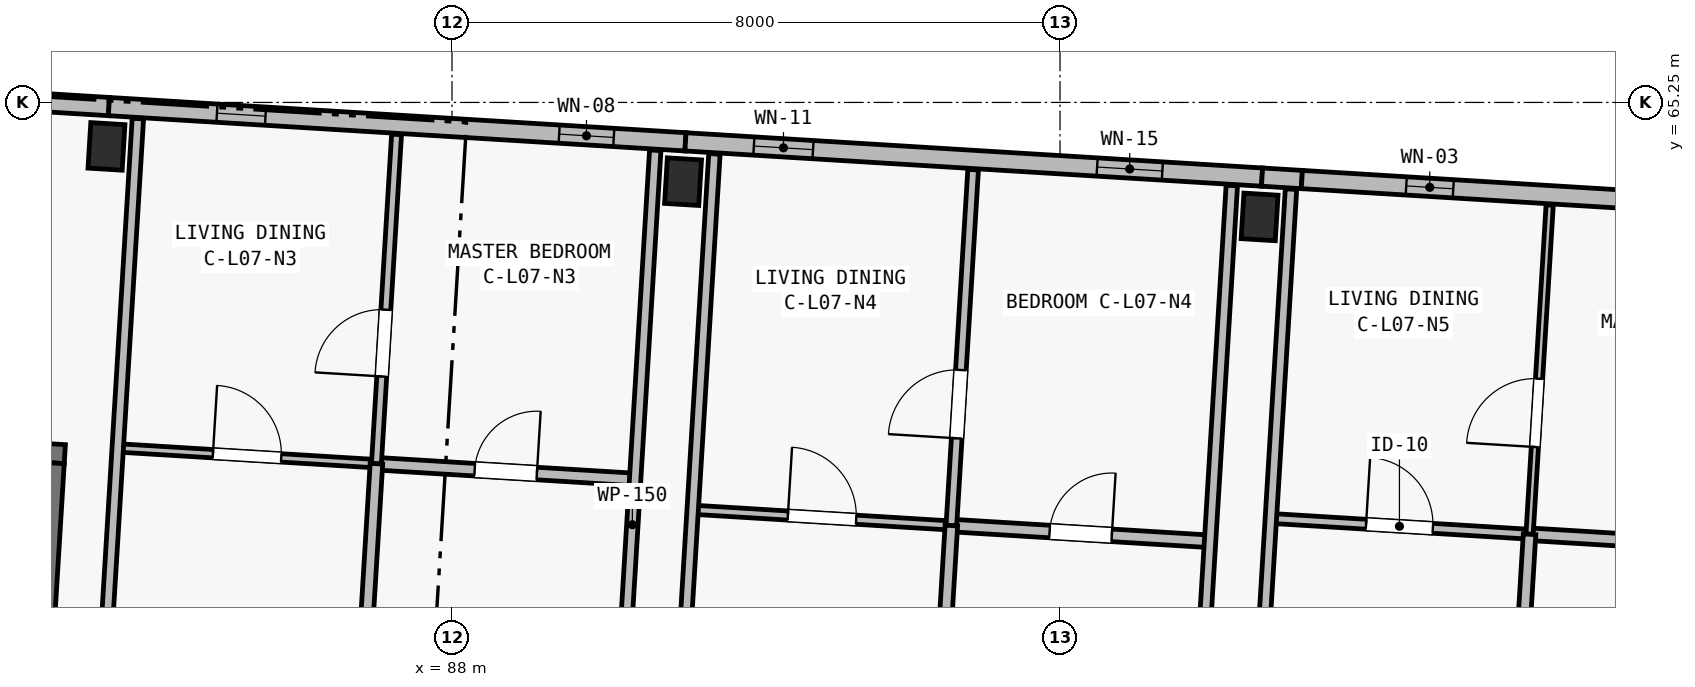
"""IFC4 building model, lengths in metres.
Left out: names, types, materials, properties, quantities, classifications, styles, units other than length and angle.
Written with IfcOpenShell. Run it as: python <this file> out.ifc"""

import sys

from ifc_helpers import new_model, si_unit, direction, frame, frame_2d, origin, origin_2d, place, context, subcontext, project, spatial, polyline, rectangle, outline, extrude, element, fill, save


model = new_model("IFC4")
c1 = context("Model", 3, precision=1e-05, world=origin(), true_north=direction((0.0, 1.0)))
c2 = subcontext(c1, "Body", "Model", "MODEL_VIEW")
j1 = project(units=[si_unit("LENGTHUNIT", "METRE"), si_unit("PLANEANGLEUNIT", "RADIAN")], contexts=[c1])
p1 = place(None, origin())
s1 = spatial("IfcSite", under=j1, at=p1, CompositionType="ELEMENT")
p2 = place(p1, origin())
s2 = spatial("IfcBuilding", under=s1, at=p2, CompositionType="ELEMENT")
p3 = place(p2, frame((0.0, 0.0, 24.65)))
s3 = spatial("IfcBuildingStorey", under=s2, at=p3, CompositionType="ELEMENT", Elevation=24.65)
for number, where, z_axis, x_axis in (
    (1, (83.454, 64.672, 0.0), (0.0, 0.0, 1.0), (0.998, -0.061, 0.0)),
    (2, (91.04, 64.208, 0.0), (0.0, 0.0, 1.0), (0.998, -0.061, 0.0)),
    (3, (98.626, 63.744, 0.0), (0.0, 0.0, 1.0), (0.998, -0.061, 0.0)),
):
    element("IfcColumn", number, at=place(p3, frame(where, z_axis=z_axis, x_axis=x_axis)), inside=s3, PredefinedType="COLUMN", context=c2, shape_type="SweptSolid", body=[
        extrude(rectangle(XDim=0.45, YDim=0.6, at=origin_2d()), origin(), (0.0, 0.0, 1.0), 3.25),
    ])
p4 = place(p3, frame((75.919, 61.05, 0.0), z_axis=(0.0, 0.0, 1.0), x_axis=(0.998135546153, -0.061036313012, 0.0)))
e4 = element("IfcWall", 4, at=p4, inside=s3, PredefinedType="SHEAR", context=c2, shape_type="SweptSolid", body=[
    extrude(rectangle(XDim=7.0, YDim=0.25, at=frame_2d((3.5, 0.0))), origin(), (0.0, 0.0, 1.0), 3.25),
])
p5 = place(p4, frame((0.45, 0.0, 0.0)))
e5 = element("IfcOpeningElement", 5, at=p5, cuts=e4, PredefinedType="OPENING", context=c2, shape_type="SweptSolid", body=[
    extrude(rectangle(XDim=0.9, YDim=2.1, at=frame_2d((0.45, 1.05))), frame((0.0, 0.14, 0.0), z_axis=(0.0, -1.0, 0.0), x_axis=(1.0, 0.0, 0.0)), (0.0, 0.0, 1.0), 0.28),
])
p6 = place(p3, frame((82.599, 57.661, 0.0), z_axis=(0.0, 0.0, 1.0), x_axis=(0.06107697143, 0.998133059046, 0.0)))
e6 = element("IfcWall", 6, at=p6, inside=s3, PredefinedType="SHEAR", context=c2, shape_type="SweptSolid", body=[
    extrude(rectangle(XDim=2.85, YDim=0.25, at=frame_2d((1.425, 0.0))), origin(), (0.0, 0.0, 1.0), 3.25),
])
p7 = place(p3, frame((81.115, 65.341, 0.0), z_axis=(0.0, 0.0, 1.0), x_axis=(0.998134103342, -0.061059902923, 0.0)))
e7 = element("IfcWall", 7, at=p7, inside=s3, PredefinedType="SOLIDWALL", context=c2, shape_type="SweptSolid", body=[
    extrude(rectangle(XDim=2.375, YDim=0.24, at=frame_2d((1.188, 0.0))), origin(), (0.0, 0.0, 1.0), 3.0),
])
p8 = place(p3, frame((83.486, 65.196, 0.0), z_axis=(0.0, 0.0, 1.0), x_axis=(0.998135669243, -0.061034300063, 0.0)))
e8 = element("IfcWall", 8, at=p8, inside=s3, PredefinedType="SOLIDWALL", context=c2, shape_type="SweptSolid", body=[
    extrude(rectangle(XDim=7.6, YDim=0.24, at=frame_2d((3.8, 0.0))), origin(), (0.0, 0.0, 1.0), 3.0),
])
p9 = place(p8, frame((1.424, 0.0, 0.44)))
e9 = element("IfcOpeningElement", 9, at=p9, cuts=e8, PredefinedType="OPENING", context=c2, shape_type="SweptSolid", body=[
    extrude(rectangle(XDim=0.64, YDim=2.18, at=frame_2d((0.32, 1.09))), frame((0.0, 0.135, 0.0), z_axis=(0.0, -1.0, 0.0), x_axis=(1.0, 0.0, 0.0)), (0.0, 0.0, 1.0), 0.27),
])
p10 = place(p8, frame((5.935, 0.0, 0.5)))
e10 = element("IfcOpeningElement", 10, at=p10, cuts=e8, PredefinedType="OPENING", context=c2, shape_type="SweptSolid", body=[
    extrude(rectangle(XDim=0.72, YDim=2.16, at=frame_2d((0.36, 1.08))), frame((0.0, 0.135, 0.0), z_axis=(0.0, -1.0, 0.0), x_axis=(1.0, 0.0, 0.0)), (0.0, 0.0, 1.0), 0.27),
])
p11 = place(p3, frame((91.072, 64.732, 0.0), z_axis=(0.0, 0.0, 1.0), x_axis=(0.998133591969, -0.061068261669, 0.0)))
e11 = element("IfcWall", 11, at=p11, inside=s3, PredefinedType="SOLIDWALL", context=c2, shape_type="SweptSolid", body=[
    extrude(rectangle(XDim=7.6, YDim=0.24, at=frame_2d((3.8, 0.0))), origin(), (0.0, 0.0, 1.0), 3.0),
])
p12 = place(p11, frame((0.902, 0.0, 0.5)))
e12 = element("IfcOpeningElement", 12, at=p12, cuts=e11, PredefinedType="OPENING", context=c2, shape_type="SweptSolid", body=[
    extrude(rectangle(XDim=0.78, YDim=2.2, at=frame_2d((0.39, 1.1))), frame((0.0, 0.135, 0.0), z_axis=(0.0, -1.0, 0.0), x_axis=(1.0, 0.0, 0.0)), (0.0, 0.0, 1.0), 0.27),
])
p13 = place(p11, frame((5.426, 0.0, 0.44)))
e13 = element("IfcOpeningElement", 13, at=p13, cuts=e11, PredefinedType="OPENING", context=c2, shape_type="SweptSolid", body=[
    extrude(rectangle(XDim=0.86, YDim=2.36, at=frame_2d((0.43, 1.18))), frame((0.0, 0.135, 0.0), z_axis=(0.0, -1.0, 0.0), x_axis=(1.0, 0.0, 0.0)), (0.0, 0.0, 1.0), 0.27),
])
p14 = place(p3, frame((98.658, 64.268, 0.0), z_axis=(0.0, 0.0, 1.0), x_axis=(0.998142018096, -0.060930384143, 0.0)))
e14 = element("IfcWall", 14, at=p14, inside=s3, PredefinedType="SOLIDWALL", context=c2, shape_type="SweptSolid", body=[
    extrude(rectangle(XDim=0.525, YDim=0.24, at=frame_2d((0.262, 0.0))), origin(), (0.0, 0.0, 1.0), 3.0),
])
p15 = place(p3, frame((99.182, 64.236, 0.0), z_axis=(0.0, 0.0, 1.0), x_axis=(0.998133711765, -0.06106630362, 0.0)))
e15 = element("IfcWall", 15, at=p15, inside=s3, PredefinedType="SOLIDWALL", context=c2, shape_type="SweptSolid", body=[
    extrude(outline(polyline([(0.0, 0.0), (7.6, 0.0), (7.6, 5.085), (0.0, 6.548), (0.0, 0.0)])), frame((0.0, 0.12, 0.0), z_axis=(0.0, -1.0, 0.0), x_axis=(1.0, 0.0, 0.0)), (0.0, 0.0, 1.0), 0.24),
])
p16 = place(p15, frame((1.376, 0.0, 0.44)))
e16 = element("IfcOpeningElement", 16, at=p16, cuts=e15, PredefinedType="OPENING", context=c2, shape_type="SweptSolid", body=[
    extrude(rectangle(XDim=0.62, YDim=2.28, at=frame_2d((0.31, 1.14))), frame((0.0, 0.135, 0.0), z_axis=(0.0, -1.0, 0.0), x_axis=(1.0, 0.0, 0.0)), (0.0, 0.0, 1.0), 0.27),
])
p17 = place(p15, frame((4.505, 0.0, 0.5)))
e17 = element("IfcOpeningElement", 17, at=p17, cuts=e15, PredefinedType="OPENING", context=c2, shape_type="SweptSolid", body=[
    extrude(rectangle(XDim=0.7, YDim=2.36, at=frame_2d((0.35, 1.18))), frame((0.0, 0.135, 0.0), z_axis=(0.0, -1.0, 0.0), x_axis=(1.0, 0.0, 0.0)), (0.0, 0.0, 1.0), 0.27),
])
p18 = place(p3, frame((83.602, 60.705, 0.0), z_axis=(0.0, 0.0, 1.0), x_axis=(0.998133617109, -0.061067850767, 0.0)))
e18 = element("IfcWall", 18, at=p18, inside=s3, PredefinedType="PARTITIONING", context=c2, shape_type="SweptSolid", body=[
    extrude(rectangle(XDim=3.41, YDim=0.11, at=frame_2d((1.705, 0.0))), origin(), (0.0, 0.0, 1.0), 2.97),
])
p19 = place(p18, frame((1.255, 0.0, 0.0)))
e19 = element("IfcOpeningElement", 19, at=p19, cuts=e18, PredefinedType="OPENING", context=c2, shape_type="SweptSolid", body=[
    extrude(rectangle(XDim=0.9, YDim=2.1, at=frame_2d((0.45, 1.05))), frame((0.0, 0.07, 0.0), z_axis=(0.0, -1.0, 0.0), x_axis=(1.0, 0.0, 0.0)), (0.0, 0.0, 1.0), 0.14),
])
p20 = place(p3, frame((87.006, 60.497, 0.0), z_axis=(0.0, 0.0, 1.0), x_axis=(0.998137711988, -0.061000884486, 0.0)))
e20 = element("IfcWall", 20, at=p20, inside=s3, PredefinedType="PLUMBINGWALL", context=c2, shape_type="SweptSolid", body=[
    extrude(rectangle(XDim=3.41, YDim=0.165, at=frame_2d((1.705, 0.0))), origin(), (0.0, 0.0, 1.0), 2.97),
])
p21 = place(p20, frame((1.295, 0.0, 0.0)))
e21 = element("IfcOpeningElement", 21, at=p21, cuts=e20, PredefinedType="OPENING", context=c2, shape_type="SweptSolid", body=[
    extrude(rectangle(XDim=0.82, YDim=2.08, at=frame_2d((0.41, 1.04))), frame((0.0, 0.097, 0.0), z_axis=(0.0, -1.0, 0.0), x_axis=(1.0, 0.0, 0.0)), (0.0, 0.0, 1.0), 0.195),
])
p22 = place(p3, frame((87.006, 60.497, 0.0), z_axis=(0.0, 0.0, 1.0), x_axis=(0.06103343432, 0.998135722182, 0.0)))
e22 = element("IfcWall", 22, at=p22, inside=s3, PredefinedType="PARTITIONING", context=c2, shape_type="SweptSolid", body=[
    extrude(rectangle(XDim=4.34, YDim=0.13, at=frame_2d((2.17, 0.0))), origin(), (0.0, 0.0, 1.0), 2.97),
])
p23 = place(p22, frame((1.15, 0.0, 0.0)))
e23 = element("IfcOpeningElement", 23, at=p23, cuts=e22, PredefinedType="OPENING", context=c2, shape_type="SweptSolid", body=[
    extrude(rectangle(XDim=0.88, YDim=2.1, at=frame_2d((0.44, 1.05))), frame((0.0, 0.08, 0.0), z_axis=(0.0, -1.0, 0.0), x_axis=(1.0, 0.0, 0.0)), (0.0, 0.0, 1.0), 0.16),
])
p24 = place(p3, frame((86.668, 54.977, 0.0), z_axis=(0.0, 0.0, 1.0), x_axis=(0.061058897293, 0.99813416486, 0.0)))
e24 = element("IfcWall", 24, at=p24, inside=s3, PredefinedType="PLUMBINGWALL", context=c2, shape_type="SweptSolid", body=[
    extrude(rectangle(XDim=5.53, YDim=0.165, at=frame_2d((2.765, 0.0))), origin(), (0.0, 0.0, 1.0), 2.97),
])
p25 = place(p3, frame((83.265, 55.185, 0.0), z_axis=(0.0, 0.0, 1.0), x_axis=(0.061046193261, 0.998134941923, 0.0)))
e25 = element("IfcWall", 25, at=p25, inside=s3, PredefinedType="PARTITIONING", context=c2, shape_type="SweptSolid", body=[
    extrude(rectangle(XDim=9.87, YDim=0.15, at=frame_2d((4.935, 0.0))), origin(), (0.0, 0.0, 1.0), 2.97),
])
p26 = place(p3, frame((90.072, 54.769, 0.0), z_axis=(0.0, 0.0, 1.0), x_axis=(0.061047700465, 0.998134849741, 0.0)))
e26 = element("IfcWall", 26, at=p26, inside=s3, PredefinedType="PARTITIONING", context=c2, shape_type="SweptSolid", body=[
    extrude(rectangle(XDim=9.87, YDim=0.15, at=frame_2d((4.935, 0.0))), origin(), (0.0, 0.0, 1.0), 2.97),
])
p27 = place(p3, frame((91.167, 59.892, 0.0), z_axis=(0.0, 0.0, 1.0), x_axis=(0.998133617109, -0.061067850767, 0.0)))
e27 = element("IfcWall", 27, at=p27, inside=s3, PredefinedType="PARTITIONING", context=c2, shape_type="SweptSolid", body=[
    extrude(rectangle(XDim=3.41, YDim=0.12, at=frame_2d((1.705, 0.0))), origin(), (0.0, 0.0, 1.0), 2.97),
])
p28 = place(p27, frame((1.255, 0.0, 0.0)))
e28 = element("IfcOpeningElement", 28, at=p28, cuts=e27, PredefinedType="OPENING", context=c2, shape_type="SweptSolid", body=[
    extrude(rectangle(XDim=0.9, YDim=2.1, at=frame_2d((0.45, 1.05))), frame((0.0, 0.075, 0.0), z_axis=(0.0, -1.0, 0.0), x_axis=(1.0, 0.0, 0.0)), (0.0, 0.0, 1.0), 0.15),
])
p29 = place(p3, frame((94.57, 59.684, 0.0), z_axis=(0.0, 0.0, 1.0), x_axis=(0.998133350094, -0.061072214879, 0.0)))
e29 = element("IfcWall", 29, at=p29, inside=s3, PredefinedType="PLUMBINGWALL", context=c2, shape_type="SweptSolid", body=[
    extrude(rectangle(XDim=3.41, YDim=0.165, at=frame_2d((1.705, 0.0))), origin(), (0.0, 0.0, 1.0), 2.97),
])
p30 = place(p29, frame((1.295, 0.0, 0.0)))
e30 = element("IfcOpeningElement", 30, at=p30, cuts=e29, PredefinedType="OPENING", context=c2, shape_type="SweptSolid", body=[
    extrude(rectangle(XDim=0.82, YDim=2.08, at=frame_2d((0.41, 1.04))), frame((0.0, 0.097, 0.0), z_axis=(0.0, -1.0, 0.0), x_axis=(1.0, 0.0, 0.0)), (0.0, 0.0, 1.0), 0.195),
])
p31 = place(p3, frame((94.57, 59.684, 0.0), z_axis=(0.0, 0.0, 1.0), x_axis=(0.061062434628, 0.998133948465, 0.0)))
e31 = element("IfcWall", 31, at=p31, inside=s3, PredefinedType="PARTITIONING", context=c2, shape_type="SweptSolid", body=[
    extrude(rectangle(XDim=4.69, YDim=0.14, at=frame_2d((2.345, 0.0))), origin(), (0.0, 0.0, 1.0), 2.97),
])
p32 = place(p31, frame((1.15, 0.0, 0.0)))
e32 = element("IfcOpeningElement", 32, at=p32, cuts=e31, PredefinedType="OPENING", context=c2, shape_type="SweptSolid", body=[
    extrude(rectangle(XDim=0.9, YDim=2.1, at=frame_2d((0.45, 1.05))), frame((0.0, 0.085, 0.0), z_axis=(0.0, -1.0, 0.0), x_axis=(1.0, 0.0, 0.0)), (0.0, 0.0, 1.0), 0.17),
])
p33 = place(p3, frame((94.254, 54.513, 0.0), z_axis=(0.0, 0.0, 1.0), x_axis=(0.061081315517, 0.998132793217, 0.0)))
e33 = element("IfcWall", 33, at=p33, inside=s3, PredefinedType="PLUMBINGWALL", context=c2, shape_type="SweptSolid", body=[
    extrude(rectangle(XDim=5.18, YDim=0.165, at=frame_2d((2.59, 0.0))), origin(), (0.0, 0.0, 1.0), 2.97),
])
for number, where, z_axis, x_axis in (
    (34, (90.85, 54.721, 0.0), (0.0, 0.0, 1.0), (0.061, 0.998, 0.0)),
    (35, (97.658, 54.305, 0.0), (0.0, 0.0, 1.0), (0.061, 0.998, 0.0)),
):
    element("IfcWall", number, at=place(p3, frame(where, z_axis=z_axis, x_axis=x_axis)), inside=s3, PredefinedType="PARTITIONING", context=c2, shape_type="SweptSolid", body=[
        extrude(rectangle(XDim=9.87, YDim=0.15, at=frame_2d((4.935, 0.0))), origin(), (0.0, 0.0, 1.0), 2.97),
    ])
p34 = place(p3, frame((98.774, 59.777, 0.0), z_axis=(0.0, 0.0, 1.0), x_axis=(0.998137711988, -0.061000884486, 0.0)))
e36 = element("IfcWall", 36, at=p34, inside=s3, PredefinedType="PARTITIONING", context=c2, shape_type="SweptSolid", body=[
    extrude(rectangle(XDim=3.41, YDim=0.13, at=frame_2d((1.705, 0.0))), origin(), (0.0, 0.0, 1.0), 2.97),
])
p35 = place(p34, frame((1.255, 0.0, 0.0)))
e37 = element("IfcOpeningElement", 37, at=p35, cuts=e36, PredefinedType="OPENING", context=c2, shape_type="SweptSolid", body=[
    extrude(rectangle(XDim=0.88, YDim=2.1, at=frame_2d((0.44, 1.05))), frame((0.0, 0.08, 0.0), z_axis=(0.0, -1.0, 0.0), x_axis=(1.0, 0.0, 0.0)), (0.0, 0.0, 1.0), 0.16),
])
p36 = place(p3, frame((102.177, 59.569, 0.0), z_axis=(0.0, 0.0, 1.0), x_axis=(0.998133350094, -0.061072214879, 0.0)))
e38 = element("IfcWall", 38, at=p36, inside=s3, PredefinedType="PLUMBINGWALL", context=c2, shape_type="SweptSolid", body=[
    extrude(rectangle(XDim=3.41, YDim=0.165, at=frame_2d((1.705, 0.0))), origin(), (0.0, 0.0, 1.0), 2.97),
])
p37 = place(p36, frame((1.295, 0.0, 0.0)))
e39 = element("IfcOpeningElement", 39, at=p37, cuts=e38, PredefinedType="OPENING", context=c2, shape_type="SweptSolid", body=[
    extrude(rectangle(XDim=0.82, YDim=2.08, at=frame_2d((0.41, 1.04))), frame((0.0, 0.097, 0.0), z_axis=(0.0, -1.0, 0.0), x_axis=(1.0, 0.0, 0.0)), (0.0, 0.0, 1.0), 0.195),
])
p38 = place(p3, frame((102.177, 59.569, 0.0), z_axis=(0.0, 0.0, 1.0), x_axis=(0.061036861365, 0.998135512621, 0.0)))
e40 = element("IfcWall", 40, at=p38, inside=s3, PredefinedType="PARTITIONING", context=c2, shape_type="SweptSolid", body=[
    extrude(rectangle(XDim=4.34, YDim=0.095, at=frame_2d((2.17, 0.0))), origin(), (0.0, 0.0, 1.0), 2.97),
])
p39 = place(p38, frame((1.15, 0.0, 0.0)))
e41 = element("IfcOpeningElement", 41, at=p39, cuts=e40, PredefinedType="OPENING", context=c2, shape_type="SweptSolid", body=[
    extrude(rectangle(XDim=0.9, YDim=2.1, at=frame_2d((0.45, 1.05))), frame((0.0, 0.062, 0.0), z_axis=(0.0, -1.0, 0.0), x_axis=(1.0, 0.0, 0.0)), (0.0, 0.0, 1.0), 0.125),
])
p40 = place(p3, frame((101.84, 54.049, 0.0), z_axis=(0.0, 0.0, 1.0), x_axis=(0.061056206715, 0.998134329447, 0.0)))
e42 = element("IfcWall", 42, at=p40, inside=s3, PredefinedType="PLUMBINGWALL", context=c2, shape_type="SweptSolid", body=[
    extrude(rectangle(XDim=5.53, YDim=0.165, at=frame_2d((2.765, 0.0))), origin(), (0.0, 0.0, 1.0), 2.97),
])
p41 = place(p3, frame((98.436, 54.258, 0.0), z_axis=(0.0, 0.0, 1.0), x_axis=(0.061047700465, 0.998134849741, 0.0)))
e43 = element("IfcWall", 43, at=p41, inside=s3, PredefinedType="PARTITIONING", context=c2, shape_type="SweptSolid", body=[
    extrude(rectangle(XDim=9.87, YDim=0.15, at=frame_2d((4.935, 0.0))), origin(), (0.0, 0.0, 1.0), 2.97),
])
p42 = place(p9, origin())
e44 = element("IfcWindow", 44, at=p42, inside=s3, PartitioningType="SINGLE_PANEL", PredefinedType="WINDOW", context=c2, shape_type="SweptSolid", body=[
    extrude(rectangle(XDim=0.64, YDim=2.18, at=frame_2d((0.32, 1.09))), frame((0.0, 0.03, 0.0), z_axis=(0.0, -1.0, 0.0), x_axis=(1.0, 0.0, 0.0)), (0.0, 0.0, 1.0), 0.06),
])
fill(e9, e44)
p43 = place(p10, origin())
e45 = element("IfcWindow", 45, at=p43, inside=s3, PartitioningType="SINGLE_PANEL", PredefinedType="WINDOW", context=c2, shape_type="SweptSolid", body=[
    extrude(rectangle(XDim=0.72, YDim=2.16, at=frame_2d((0.36, 1.08))), frame((0.0, 0.03, 0.0), z_axis=(0.0, -1.0, 0.0), x_axis=(1.0, 0.0, 0.0)), (0.0, 0.0, 1.0), 0.06),
])
fill(e10, e45)
p44 = place(p12, origin())
e46 = element("IfcWindow", 46, at=p44, inside=s3, PartitioningType="SINGLE_PANEL", PredefinedType="WINDOW", context=c2, shape_type="SweptSolid", body=[
    extrude(rectangle(XDim=0.78, YDim=2.2, at=frame_2d((0.39, 1.1))), frame((0.0, 0.03, 0.0), z_axis=(0.0, -1.0, 0.0), x_axis=(1.0, 0.0, 0.0)), (0.0, 0.0, 1.0), 0.06),
])
fill(e12, e46)
p45 = place(p13, origin())
e47 = element("IfcWindow", 47, at=p45, inside=s3, PartitioningType="SINGLE_PANEL", PredefinedType="WINDOW", context=c2, shape_type="SweptSolid", body=[
    extrude(rectangle(XDim=0.86, YDim=2.36, at=frame_2d((0.43, 1.18))), frame((0.0, 0.03, 0.0), z_axis=(0.0, -1.0, 0.0), x_axis=(1.0, 0.0, 0.0)), (0.0, 0.0, 1.0), 0.06),
])
fill(e13, e47)
p46 = place(p16, origin())
e48 = element("IfcWindow", 48, at=p46, inside=s3, PartitioningType="SINGLE_PANEL", PredefinedType="WINDOW", context=c2, shape_type="SweptSolid", body=[
    extrude(rectangle(XDim=0.62, YDim=2.28, at=frame_2d((0.31, 1.14))), frame((0.0, 0.03, 0.0), z_axis=(0.0, -1.0, 0.0), x_axis=(1.0, 0.0, 0.0)), (0.0, 0.0, 1.0), 0.06),
])
fill(e16, e48)
p47 = place(p19, origin())
e49 = element("IfcDoor", 49, at=p47, inside=s3, OperationType="SINGLE_SWING_LEFT", PredefinedType="DOOR", context=c2, shape_type="SweptSolid", body=[
    extrude(rectangle(XDim=0.9, YDim=2.1, at=frame_2d((0.45, 1.05))), frame((0.0, 0.025, 0.0), z_axis=(0.0, -1.0, 0.0), x_axis=(1.0, 0.0, 0.0)), (0.0, 0.0, 1.0), 0.05),
])
fill(e19, e49)
p48 = place(p21, origin())
e50 = element("IfcDoor", 50, at=p48, inside=s3, OperationType="SINGLE_SWING_RIGHT", PredefinedType="DOOR", context=c2, shape_type="SweptSolid", body=[
    extrude(rectangle(XDim=0.82, YDim=2.08, at=frame_2d((0.41, 1.04))), frame((0.0, 0.025, 0.0), z_axis=(0.0, -1.0, 0.0), x_axis=(1.0, 0.0, 0.0)), (0.0, 0.0, 1.0), 0.05),
])
fill(e21, e50)
p49 = place(p23, origin())
e51 = element("IfcDoor", 51, at=p49, inside=s3, OperationType="SINGLE_SWING_LEFT", PredefinedType="DOOR", context=c2, shape_type="SweptSolid", body=[
    extrude(rectangle(XDim=0.88, YDim=2.1, at=frame_2d((0.44, 1.05))), frame((0.0, 0.025, 0.0), z_axis=(0.0, -1.0, 0.0), x_axis=(1.0, 0.0, 0.0)), (0.0, 0.0, 1.0), 0.05),
])
fill(e23, e51)
p50 = place(p28, origin())
e52 = element("IfcDoor", 52, at=p50, inside=s3, OperationType="SINGLE_SWING_LEFT", PredefinedType="DOOR", context=c2, shape_type="SweptSolid", body=[
    extrude(rectangle(XDim=0.9, YDim=2.1, at=frame_2d((0.45, 1.05))), frame((0.0, 0.025, 0.0), z_axis=(0.0, -1.0, 0.0), x_axis=(1.0, 0.0, 0.0)), (0.0, 0.0, 1.0), 0.05),
])
fill(e28, e52)
p51 = place(p30, origin())
e53 = element("IfcDoor", 53, at=p51, inside=s3, OperationType="SINGLE_SWING_RIGHT", PredefinedType="DOOR", context=c2, shape_type="SweptSolid", body=[
    extrude(rectangle(XDim=0.82, YDim=2.08, at=frame_2d((0.41, 1.04))), frame((0.0, 0.025, 0.0), z_axis=(0.0, -1.0, 0.0), x_axis=(1.0, 0.0, 0.0)), (0.0, 0.0, 1.0), 0.05),
])
fill(e30, e53)
p52 = place(p32, origin())
e54 = element("IfcDoor", 54, at=p52, inside=s3, OperationType="SINGLE_SWING_LEFT", PredefinedType="DOOR", context=c2, shape_type="SweptSolid", body=[
    extrude(rectangle(XDim=0.9, YDim=2.1, at=frame_2d((0.45, 1.05))), frame((0.0, 0.025, 0.0), z_axis=(0.0, -1.0, 0.0), x_axis=(1.0, 0.0, 0.0)), (0.0, 0.0, 1.0), 0.05),
])
fill(e32, e54)
p53 = place(p35, origin())
e55 = element("IfcDoor", 55, at=p53, inside=s3, OperationType="SINGLE_SWING_LEFT", PredefinedType="DOOR", context=c2, shape_type="SweptSolid", body=[
    extrude(rectangle(XDim=0.88, YDim=2.1, at=frame_2d((0.44, 1.05))), frame((0.0, 0.025, 0.0), z_axis=(0.0, -1.0, 0.0), x_axis=(1.0, 0.0, 0.0)), (0.0, 0.0, 1.0), 0.05),
])
fill(e37, e55)
p54 = place(p39, origin())
e56 = element("IfcDoor", 56, at=p54, inside=s3, OperationType="SINGLE_SWING_LEFT", PredefinedType="DOOR", context=c2, shape_type="SweptSolid", body=[
    extrude(rectangle(XDim=0.9, YDim=2.1, at=frame_2d((0.45, 1.05))), frame((0.0, 0.025, 0.0), z_axis=(0.0, -1.0, 0.0), x_axis=(1.0, 0.0, 0.0)), (0.0, 0.0, 1.0), 0.05),
])
fill(e41, e56)
save(model, sys.argv[1])
